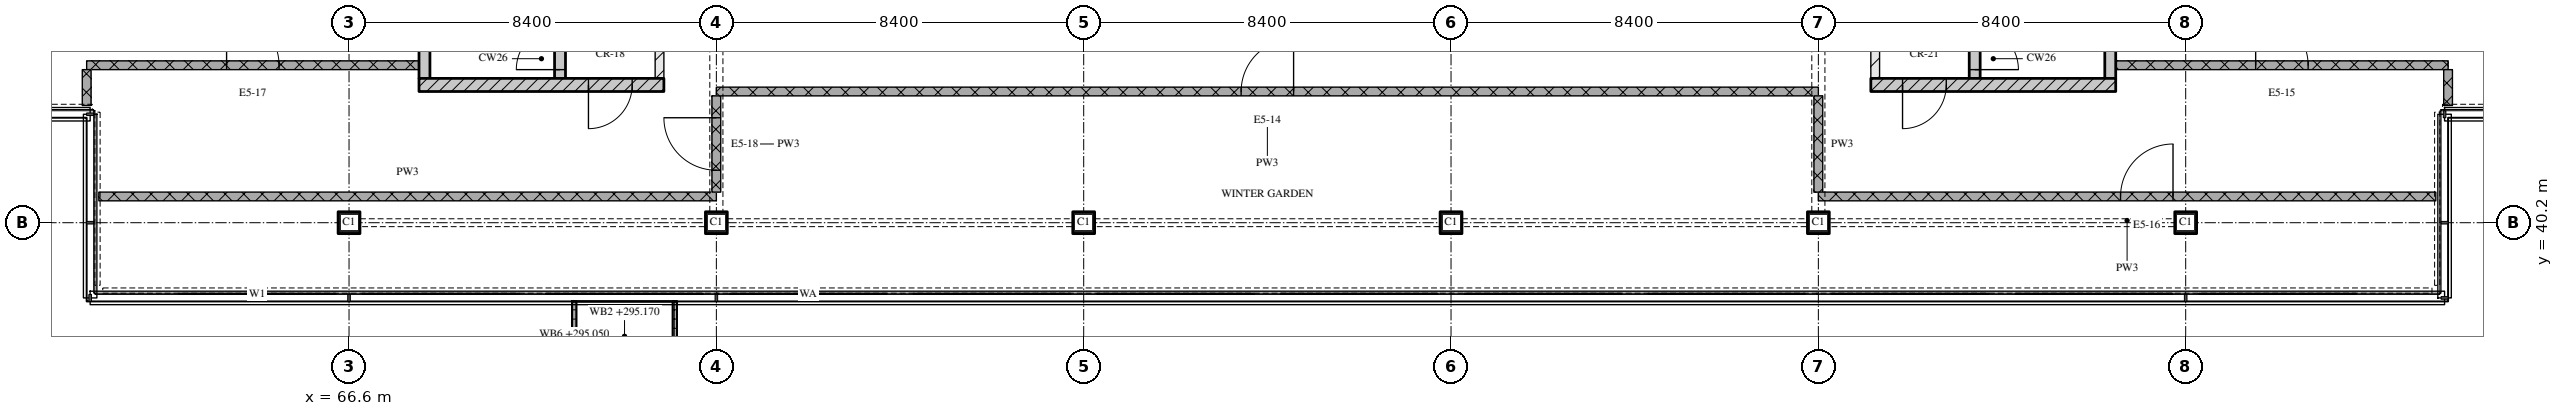
"""IFC4 building model, lengths in metres.
Left out: names, types, materials, properties, quantities, classifications, styles, units other than length and angle.
Written with IfcOpenShell. Run it as: python <this file> out.ifc"""

import sys

from ifc_helpers import new_model, si_unit, direction, frame, frame_2d, origin, origin_2d, place, context, subcontext, project, spatial, polyline, rectangle, outline, extrude, element, fill, save


model = new_model("IFC4")
c1 = context("Model", 3, precision=1e-05, world=origin(), true_north=direction((0.0, 1.0)))
c2 = subcontext(c1, "Body", "Model", "MODEL_VIEW")
j1 = project(units=[si_unit("LENGTHUNIT", "METRE"), si_unit("PLANEANGLEUNIT", "RADIAN")], contexts=[c1])
p1 = place(None, origin())
s1 = spatial("IfcSite", under=j1, at=p1, CompositionType="ELEMENT")
p2 = place(p1, origin())
s2 = spatial("IfcBuilding", under=s1, at=p2, CompositionType="ELEMENT")
p3 = place(p2, frame((0.0, 0.0, 292.35)))
s3 = spatial("IfcBuildingStorey", under=s2, at=p3, CompositionType="ELEMENT", Elevation=292.35)
for number, where, z_axis, x_axis in (
    (1, (66.6, 40.2, 0.0), (0.0, 0.0, 1.0), (1.0, 0.0, 0.0)),
    (2, (75.0, 40.2, 0.0), (0.0, 0.0, 1.0), (1.0, 0.0, 0.0)),
    (3, (83.4, 40.2, 0.0), (0.0, 0.0, 1.0), (1.0, 0.0, 0.0)),
    (4, (91.8, 40.2, 0.0), (0.0, 0.0, 1.0), (1.0, 0.0, 0.0)),
    (5, (100.2, 40.2, 0.0), (0.0, 0.0, 1.0), (1.0, 0.0, 0.0)),
    (6, (108.6, 40.2, 0.0), (0.0, 0.0, 1.0), (1.0, 0.0, 0.0)),
):
    element("IfcColumn", number, at=place(p3, frame(where, z_axis=z_axis, x_axis=x_axis)), inside=s3, PredefinedType="COLUMN", context=c2, shape_type="SweptSolid", body=[
        extrude(rectangle(XDim=0.5, YDim=0.5, at=origin_2d()), origin(), (0.0, 0.0, 1.0), 3.6),
    ])
p4 = place(p3, origin())
e7 = element("IfcWall", 7, at=p4, inside=s3, PredefinedType="SOLIDWALL", context=c2, shape_type="SweptSolid", body=[
    extrude(outline(polyline([(71.7, 38.4), (71.8, 38.4), (71.8, 36.9), (74.0, 36.9), (74.0, 38.4), (74.1, 38.4), (74.1, 36.8), (71.7, 36.8), (71.7, 38.4)])), origin(), (0.0, 0.0, 1.0), 1.0),
])
p5 = place(p3, frame((68.2, 43.35, 0.0), z_axis=(0.0, 0.0, 1.0), x_axis=(1.0, 0.0, 0.0)))
e8 = element("IfcWall", 8, at=p5, inside=s3, PredefinedType="SOLIDWALL", context=c2, shape_type="SweptSolid", body=[
    extrude(rectangle(XDim=5.6, YDim=0.3, at=frame_2d((2.8, 0.0))), origin(), (0.0, 0.0, 1.0), 3.32),
])
p6 = place(p5, frame((3.875, 0.0, 0.0)))
e9 = element("IfcOpeningElement", 9, at=p6, cuts=e8, PredefinedType="OPENING", context=c2, shape_type="SweptSolid", body=[
    extrude(rectangle(XDim=1.0, YDim=2.1, at=frame_2d((0.5, 1.05))), frame((0.0, 0.16, 0.0), z_axis=(0.0, -1.0, 0.0), x_axis=(1.0, 0.0, 0.0)), (0.0, 0.0, 1.0), 0.32),
])
p7 = place(p3, frame((68.325, 43.5, 0.0), z_axis=(0.0, 0.0, 1.0), x_axis=(0.0, 1.0, 0.0)))
e10 = element("IfcWall", 10, at=p7, inside=s3, PredefinedType="SOLIDWALL", context=c2, shape_type="SweptSolid", body=[
    extrude(rectangle(XDim=6.9, YDim=0.25, at=frame_2d((3.45, 0.0))), origin(), (0.0, 0.0, 1.0), 3.32),
])
p8 = place(p3, frame((71.425, 43.5, 0.0), z_axis=(0.0, 0.0, 1.0), x_axis=(0.0, 1.0, 0.0)))
e11 = element("IfcWall", 11, at=p8, inside=s3, PredefinedType="SOLIDWALL", context=c2, shape_type="SweptSolid", body=[
    extrude(rectangle(XDim=6.9, YDim=0.25, at=frame_2d((3.45, 0.0))), origin(), (0.0, 0.0, 1.0), 3.32),
])
p9 = place(p8, frame((0.2, 0.0, 0.0)))
e12 = element("IfcOpeningElement", 12, at=p9, cuts=e11, PredefinedType="OPENING", context=c2, shape_type="SweptSolid", body=[
    extrude(rectangle(XDim=1.0, YDim=2.1, at=frame_2d((0.5, 1.05))), frame((0.0, 0.135, 0.0), z_axis=(0.0, -1.0, 0.0), x_axis=(1.0, 0.0, 0.0)), (0.0, 0.0, 1.0), 0.27),
])
p10 = place(p3, frame((73.7, 43.5, 0.0), z_axis=(0.0, 0.0, 1.0), x_axis=(0.0, 1.0, 0.0)))
e13 = element("IfcWall", 13, at=p10, inside=s3, PredefinedType="PARTITIONING", context=c2, shape_type="SweptSolid", body=[
    extrude(rectangle(XDim=6.9, YDim=0.2, at=frame_2d((3.45, 0.0))), origin(), (0.0, 0.0, 1.0), 3.32),
])
p11 = place(p10, frame((1.0, 0.0, 0.0)))
e14 = element("IfcOpeningElement", 14, at=p11, cuts=e13, PredefinedType="OPENING", context=c2, shape_type="SweptSolid", body=[
    extrude(rectangle(XDim=1.0, YDim=2.1, at=frame_2d((0.5, 1.05))), frame((0.0, 0.11, 0.0), z_axis=(0.0, -1.0, 0.0), x_axis=(1.0, 0.0, 0.0)), (0.0, 0.0, 1.0), 0.22),
])
p12 = place(p3, frame((101.4, 43.35, 0.0), z_axis=(0.0, 0.0, 1.0), x_axis=(1.0, 0.0, 0.0)))
e15 = element("IfcWall", 15, at=p12, inside=s3, PredefinedType="SOLIDWALL", context=c2, shape_type="SweptSolid", body=[
    extrude(rectangle(XDim=5.6, YDim=0.3, at=frame_2d((2.8, 0.0))), origin(), (0.0, 0.0, 1.0), 3.32),
])
p13 = place(p12, frame((0.725, 0.0, 0.0)))
e16 = element("IfcOpeningElement", 16, at=p13, cuts=e15, PredefinedType="OPENING", context=c2, shape_type="SweptSolid", body=[
    extrude(rectangle(XDim=1.0, YDim=2.1, at=frame_2d((0.5, 1.05))), frame((0.0, 0.16, 0.0), z_axis=(0.0, -1.0, 0.0), x_axis=(1.0, 0.0, 0.0)), (0.0, 0.0, 1.0), 0.32),
])
p14 = place(p3, frame((101.5, 43.5, 0.0), z_axis=(0.0, 0.0, 1.0), x_axis=(0.0, 1.0, 0.0)))
e17 = element("IfcWall", 17, at=p14, inside=s3, PredefinedType="PARTITIONING", context=c2, shape_type="SweptSolid", body=[
    extrude(rectangle(XDim=6.9, YDim=0.2, at=frame_2d((3.45, 0.0))), origin(), (0.0, 0.0, 1.0), 3.32),
])
p15 = place(p14, frame((1.0, 0.0, 0.0)))
e18 = element("IfcOpeningElement", 18, at=p15, cuts=e17, PredefinedType="OPENING", context=c2, shape_type="SweptSolid", body=[
    extrude(rectangle(XDim=1.0, YDim=2.1, at=frame_2d((0.5, 1.05))), frame((0.0, 0.11, 0.0), z_axis=(0.0, -1.0, 0.0), x_axis=(1.0, 0.0, 0.0)), (0.0, 0.0, 1.0), 0.22),
])
p16 = place(p3, frame((103.775, 43.5, 0.0), z_axis=(0.0, 0.0, 1.0), x_axis=(0.0, 1.0, 0.0)))
e19 = element("IfcWall", 19, at=p16, inside=s3, PredefinedType="SOLIDWALL", context=c2, shape_type="SweptSolid", body=[
    extrude(rectangle(XDim=6.9, YDim=0.25, at=frame_2d((3.45, 0.0))), origin(), (0.0, 0.0, 1.0), 3.32),
])
p17 = place(p16, frame((0.2, 0.0, 0.0)))
e20 = element("IfcOpeningElement", 20, at=p17, cuts=e19, PredefinedType="OPENING", context=c2, shape_type="SweptSolid", body=[
    extrude(rectangle(XDim=1.0, YDim=2.1, at=frame_2d((0.5, 1.05))), frame((0.0, 0.135, 0.0), z_axis=(0.0, -1.0, 0.0), x_axis=(1.0, 0.0, 0.0)), (0.0, 0.0, 1.0), 0.27),
])
p18 = place(p3, frame((106.875, 43.5, 0.0), z_axis=(0.0, 0.0, 1.0), x_axis=(0.0, 1.0, 0.0)))
e21 = element("IfcWall", 21, at=p18, inside=s3, PredefinedType="SOLIDWALL", context=c2, shape_type="SweptSolid", body=[
    extrude(rectangle(XDim=6.9, YDim=0.25, at=frame_2d((3.45, 0.0))), origin(), (0.0, 0.0, 1.0), 3.32),
])
p19 = place(p3, frame((60.88, 40.8, 0.0), z_axis=(0.0, 0.0, 1.0), x_axis=(1.0, 0.0, 0.0)))
e22 = element("IfcWall", 22, at=p19, inside=s3, PredefinedType="PARTITIONING", context=c2, shape_type="SweptSolid", body=[
    extrude(rectangle(XDim=14.12, YDim=0.2, at=frame_2d((7.06, 0.0))), origin(), (0.0, 0.0, 1.0), 3.32),
])
p20 = place(p3, frame((114.32, 40.8, 0.0), z_axis=(0.0, 0.0, 1.0), x_axis=(-1.0, 0.0, 0.0)))
e23 = element("IfcWall", 23, at=p20, inside=s3, PredefinedType="PARTITIONING", context=c2, shape_type="SweptSolid", body=[
    extrude(rectangle(XDim=14.12, YDim=0.2, at=frame_2d((7.06, 0.0))), origin(), (0.0, 0.0, 1.0), 3.32),
])
p21 = place(p20, frame((6.01, 0.0, 0.0)))
e24 = element("IfcOpeningElement", 24, at=p21, cuts=e23, PredefinedType="OPENING", context=c2, shape_type="SweptSolid", body=[
    extrude(rectangle(XDim=1.2, YDim=2.1, at=frame_2d((0.6, 1.05))), frame((0.0, 0.11, 0.0), z_axis=(0.0, -1.0, 0.0), x_axis=(1.0, 0.0, 0.0)), (0.0, 0.0, 1.0), 0.22),
])
p22 = place(p3, frame((100.2, 43.2, 0.0), z_axis=(0.0, 0.0, 1.0), x_axis=(-1.0, 0.0, 0.0)))
e25 = element("IfcWall", 25, at=p22, inside=s3, PredefinedType="PARTITIONING", context=c2, shape_type="SweptSolid", body=[
    extrude(rectangle(XDim=25.2, YDim=0.2, at=frame_2d((12.6, 0.0))), origin(), (0.0, 0.0, 1.0), 3.32),
])
p23 = place(p22, frame((12.0, 0.0, 0.0)))
e26 = element("IfcOpeningElement", 26, at=p23, cuts=e25, PredefinedType="OPENING", context=c2, shape_type="SweptSolid", body=[
    extrude(rectangle(XDim=1.2, YDim=2.1, at=frame_2d((0.6, 1.05))), frame((0.0, 0.11, 0.0), z_axis=(0.0, -1.0, 0.0), x_axis=(1.0, 0.0, 0.0)), (0.0, 0.0, 1.0), 0.22),
])
p24 = place(p3, frame((60.6, 43.8, 0.0), z_axis=(0.0, 0.0, 1.0), x_axis=(1.0, 0.0, 0.0)))
e27 = element("IfcWall", 27, at=p24, inside=s3, PredefinedType="PARTITIONING", context=c2, shape_type="SweptSolid", body=[
    extrude(rectangle(XDim=7.6, YDim=0.2, at=frame_2d((3.8, 0.0))), origin(), (0.0, 0.0, 1.0), 3.32),
])
p25 = place(p24, frame((3.2, 0.0, 0.0)))
e28 = element("IfcOpeningElement", 28, at=p25, cuts=e27, PredefinedType="OPENING", context=c2, shape_type="SweptSolid", body=[
    extrude(rectangle(XDim=1.2, YDim=2.1, at=frame_2d((0.6, 1.05))), frame((0.0, 0.11, 0.0), z_axis=(0.0, -1.0, 0.0), x_axis=(1.0, 0.0, 0.0)), (0.0, 0.0, 1.0), 0.22),
])
p26 = place(p3, frame((107.0, 43.8, 0.0), z_axis=(0.0, 0.0, 1.0), x_axis=(1.0, 0.0, 0.0)))
e29 = element("IfcWall", 29, at=p26, inside=s3, PredefinedType="PARTITIONING", context=c2, shape_type="SweptSolid", body=[
    extrude(rectangle(XDim=7.6, YDim=0.2, at=frame_2d((3.8, 0.0))), origin(), (0.0, 0.0, 1.0), 3.32),
])
p27 = place(p26, frame((3.2, 0.0, 0.0)))
e30 = element("IfcOpeningElement", 30, at=p27, cuts=e29, PredefinedType="OPENING", context=c2, shape_type="SweptSolid", body=[
    extrude(rectangle(XDim=1.2, YDim=2.1, at=frame_2d((0.6, 1.05))), frame((0.0, 0.11, 0.0), z_axis=(0.0, -1.0, 0.0), x_axis=(1.0, 0.0, 0.0)), (0.0, 0.0, 1.0), 0.22),
])
p28 = place(p3, frame((60.6, 43.7, 0.0), z_axis=(0.0, 0.0, 1.0), x_axis=(0.0, -1.0, 0.0)))
e31 = element("IfcWall", 31, at=p28, inside=s3, PredefinedType="PARTITIONING", context=c2, shape_type="SweptSolid", body=[
    extrude(rectangle(XDim=0.82, YDim=0.2, at=frame_2d((0.41, 0.0))), origin(), (0.0, 0.0, 1.0), 3.32),
])
p29 = place(p3, frame((75.0, 43.1, 0.0), z_axis=(0.0, 0.0, 1.0), x_axis=(0.0, -1.0, 0.0)))
e32 = element("IfcWall", 32, at=p29, inside=s3, PredefinedType="PARTITIONING", context=c2, shape_type="SweptSolid", body=[
    extrude(rectangle(XDim=2.2, YDim=0.2, at=frame_2d((1.1, 0.0))), origin(), (0.0, 0.0, 1.0), 2.53),
])
p30 = place(p29, frame((0.5, 0.0, 0.0)))
e33 = element("IfcOpeningElement", 33, at=p30, cuts=e32, PredefinedType="OPENING", context=c2, shape_type="SweptSolid", body=[
    extrude(rectangle(XDim=1.2, YDim=2.1, at=frame_2d((0.6, 1.05))), frame((0.0, 0.11, 0.0), z_axis=(0.0, -1.0, 0.0), x_axis=(1.0, 0.0, 0.0)), (0.0, 0.0, 1.0), 0.22),
])
p31 = place(p3, frame((100.2, 43.1, 0.0), z_axis=(0.0, 0.0, 1.0), x_axis=(0.0, -1.0, 0.0)))
e34 = element("IfcWall", 34, at=p31, inside=s3, PredefinedType="PARTITIONING", context=c2, shape_type="SweptSolid", body=[
    extrude(rectangle(XDim=2.2, YDim=0.2, at=frame_2d((1.1, 0.0))), origin(), (0.0, 0.0, 1.0), 2.53),
])
p32 = place(p3, frame((114.6, 43.7, 0.0), z_axis=(0.0, 0.0, 1.0), x_axis=(0.0, -1.0, 0.0)))
e35 = element("IfcWall", 35, at=p32, inside=s3, PredefinedType="PARTITIONING", context=c2, shape_type="SweptSolid", body=[
    extrude(rectangle(XDim=0.82, YDim=0.2, at=frame_2d((0.41, 0.0))), origin(), (0.0, 0.0, 1.0), 3.32),
])
p33 = place(p6, origin())
e36 = element("IfcDoor", 36, at=p33, inside=s3, OperationType="SINGLE_SWING_RIGHT", PredefinedType="DOOR", context=c2, shape_type="SweptSolid", body=[
    extrude(rectangle(XDim=1.0, YDim=2.1, at=frame_2d((0.5, 1.05))), frame((0.0, 0.025, 0.0), z_axis=(0.0, -1.0, 0.0), x_axis=(1.0, 0.0, 0.0)), (0.0, 0.0, 1.0), 0.05),
])
fill(e9, e36)
p34 = place(p9, origin())
e37 = element("IfcDoor", 37, at=p34, inside=s3, OperationType="SINGLE_SWING_LEFT", PredefinedType="DOOR", context=c2, shape_type="SweptSolid", body=[
    extrude(rectangle(XDim=1.0, YDim=2.1, at=frame_2d((0.5, 1.05))), frame((0.0, 0.025, 0.0), z_axis=(0.0, -1.0, 0.0), x_axis=(1.0, 0.0, 0.0)), (0.0, 0.0, 1.0), 0.05),
])
fill(e12, e37)
p35 = place(p13, origin())
e38 = element("IfcDoor", 38, at=p35, inside=s3, OperationType="SINGLE_SWING_RIGHT", PredefinedType="DOOR", context=c2, shape_type="SweptSolid", body=[
    extrude(rectangle(XDim=1.0, YDim=2.1, at=frame_2d((0.5, 1.05))), frame((0.0, 0.025, 0.0), z_axis=(0.0, -1.0, 0.0), x_axis=(1.0, 0.0, 0.0)), (0.0, 0.0, 1.0), 0.05),
])
fill(e16, e38)
p36 = place(p17, origin())
e39 = element("IfcDoor", 39, at=p36, inside=s3, OperationType="SINGLE_SWING_RIGHT", PredefinedType="DOOR", context=c2, shape_type="SweptSolid", body=[
    extrude(rectangle(XDim=1.0, YDim=2.1, at=frame_2d((0.5, 1.05))), frame((0.0, 0.025, 0.0), z_axis=(0.0, -1.0, 0.0), x_axis=(1.0, 0.0, 0.0)), (0.0, 0.0, 1.0), 0.05),
])
fill(e20, e39)
p37 = place(p21, origin())
e40 = element("IfcDoor", 40, at=p37, inside=s3, OperationType="SINGLE_SWING_RIGHT", PredefinedType="DOOR", context=c2, shape_type="SweptSolid", body=[
    extrude(rectangle(XDim=1.2, YDim=2.1, at=frame_2d((0.6, 1.05))), frame((0.0, 0.025, 0.0), z_axis=(0.0, -1.0, 0.0), x_axis=(1.0, 0.0, 0.0)), (0.0, 0.0, 1.0), 0.05),
])
fill(e24, e40)
p38 = place(p23, origin())
e41 = element("IfcDoor", 41, at=p38, inside=s3, OperationType="SINGLE_SWING_RIGHT", PredefinedType="DOOR", context=c2, shape_type="SweptSolid", body=[
    extrude(rectangle(XDim=1.2, YDim=2.1, at=frame_2d((0.6, 1.05))), frame((0.0, 0.025, 0.0), z_axis=(0.0, -1.0, 0.0), x_axis=(1.0, 0.0, 0.0)), (0.0, 0.0, 1.0), 0.05),
])
fill(e26, e41)
p39 = place(p25, origin())
e42 = element("IfcDoor", 42, at=p39, inside=s3, OperationType="SINGLE_SWING_LEFT", PredefinedType="DOOR", context=c2, shape_type="SweptSolid", body=[
    extrude(rectangle(XDim=1.2, YDim=2.1, at=frame_2d((0.6, 1.05))), frame((0.0, 0.025, 0.0), z_axis=(0.0, -1.0, 0.0), x_axis=(1.0, 0.0, 0.0)), (0.0, 0.0, 1.0), 0.05),
])
fill(e28, e42)
p40 = place(p27, origin())
e43 = element("IfcDoor", 43, at=p40, inside=s3, OperationType="SINGLE_SWING_LEFT", PredefinedType="DOOR", context=c2, shape_type="SweptSolid", body=[
    extrude(rectangle(XDim=1.2, YDim=2.1, at=frame_2d((0.6, 1.05))), frame((0.0, 0.025, 0.0), z_axis=(0.0, -1.0, 0.0), x_axis=(1.0, 0.0, 0.0)), (0.0, 0.0, 1.0), 0.05),
])
fill(e30, e43)
p41 = place(p30, origin())
e44 = element("IfcDoor", 44, at=p41, inside=s3, OperationType="SINGLE_SWING_RIGHT", PredefinedType="DOOR", context=c2, shape_type="SweptSolid", body=[
    extrude(rectangle(XDim=1.2, YDim=2.1, at=frame_2d((0.6, 1.05))), frame((0.0, 0.025, 0.0), z_axis=(0.0, -1.0, 0.0), x_axis=(1.0, 0.0, 0.0)), (0.0, 0.0, 1.0), 0.05),
])
fill(e33, e44)
save(model, sys.argv[1])
